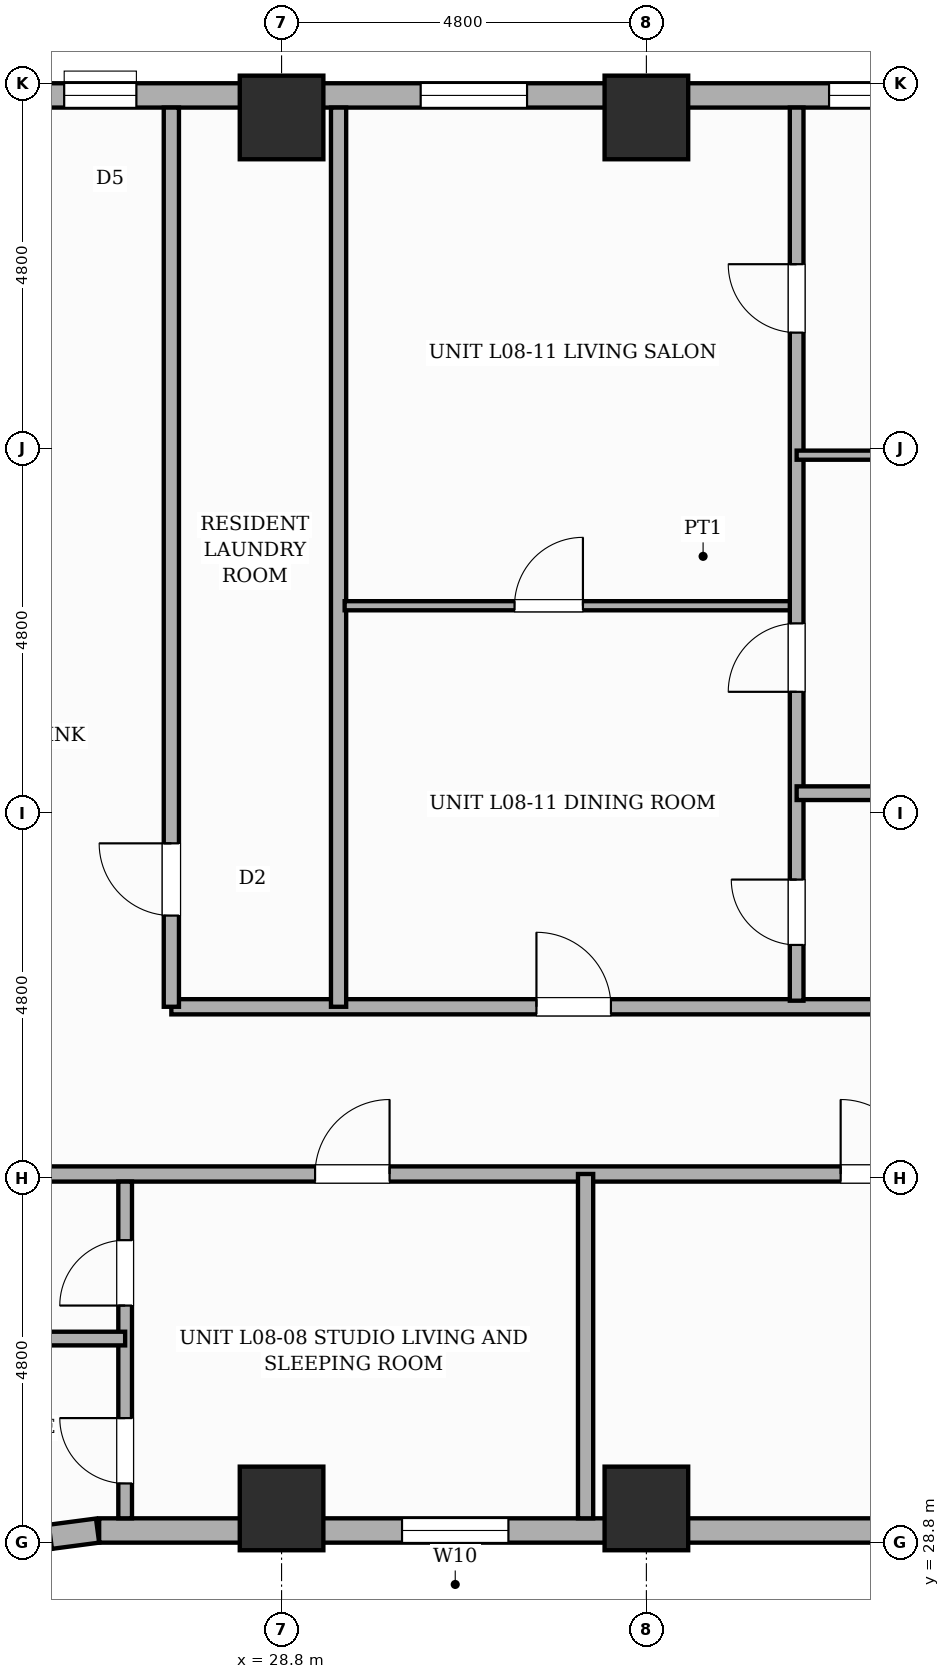
"""IFC4 building model, lengths in metres.
Left out: names, types, materials, properties, quantities, classifications, styles, units other than length and angle.
Written with IfcOpenShell. Run it as: python <this file> out.ifc"""

import sys

from ifc_helpers import new_model, si_unit, direction, frame, frame_2d, origin, origin_2d, place, context, subcontext, project, spatial, rectangle, extrude, element, fill, save


model = new_model("IFC4")
c1 = context("Model", 3, precision=1e-05, world=origin(), true_north=direction((0.0, 1.0)))
c2 = subcontext(c1, "Body", "Model", "MODEL_VIEW")
j1 = project(units=[si_unit("LENGTHUNIT", "METRE"), si_unit("PLANEANGLEUNIT", "RADIAN")], contexts=[c1])
p1 = place(None, origin())
s1 = spatial("IfcSite", under=j1, at=p1, CompositionType="ELEMENT")
p2 = place(p1, origin())
s2 = spatial("IfcBuilding", under=s1, at=p2, CompositionType="ELEMENT")
p3 = place(p2, frame((0.0, 0.0, 35.8)))
s3 = spatial("IfcBuildingStorey", under=s2, at=p3, CompositionType="ELEMENT", Elevation=35.8)
for number, where, z_axis, x_axis in (
    (1, (28.8, 29.25, 0.0), (0.0, 0.0, 1.0), (1.0, 0.0, 0.0)),
    (2, (28.8, 47.55, 0.0), (0.0, 0.0, 1.0), (1.0, 0.0, 0.0)),
    (3, (33.6, 29.25, 0.0), (0.0, 0.0, 1.0), (1.0, 0.0, 0.0)),
    (4, (33.6, 47.55, 0.0), (0.0, 0.0, 1.0), (1.0, 0.0, 0.0)),
):
    element("IfcColumn", number, at=place(p3, frame(where, z_axis=z_axis, x_axis=x_axis)), inside=s3, PredefinedType="COLUMN", context=c2, shape_type="SweptSolid", body=[
        extrude(rectangle(XDim=1.1, YDim=1.1, at=origin_2d()), origin(), (0.0, 0.0, 1.0), 3.6),
    ])
p4 = place(p3, frame((7.2, 47.84, 0.0), z_axis=(0.0, 0.0, 1.0), x_axis=(1.0, 0.0, 0.0)))
e5 = element("IfcWall", 5, at=p4, inside=s3, PredefinedType="STANDARD", context=c2, shape_type="SweptSolid", body=[
    extrude(rectangle(XDim=48.0, YDim=0.32, at=frame_2d((24.0, 0.0))), origin(), (0.0, 0.0, 1.0), 2.53),
])
p5 = place(p4, frame((28.803, 0.0, 0.65)))
e6 = element("IfcOpeningElement", 6, at=p5, cuts=e5, PredefinedType="OPENING", context=c2, shape_type="SweptSolid", body=[
    extrude(rectangle(XDim=1.4, YDim=1.1, at=frame_2d((0.7, 0.55))), frame((0.0, 0.17, 0.0), z_axis=(0.0, -1.0, 0.0), x_axis=(1.0, 0.0, 0.0)), (0.0, 0.0, 1.0), 0.34),
])
p6 = place(p4, frame((43.414, 0.0, 0.45)))
e7 = element("IfcOpeningElement", 7, at=p6, cuts=e5, PredefinedType="OPENING", context=c2, shape_type="SweptSolid", body=[
    extrude(rectangle(XDim=0.95, YDim=1.8, at=frame_2d((0.475, 0.9))), frame((0.0, 0.17, 0.0), z_axis=(0.0, -1.0, 0.0), x_axis=(1.0, 0.0, 0.0)), (0.0, 0.0, 1.0), 0.34),
])
p7 = place(p4, frame((18.74, 0.0, 0.45)))
e8 = element("IfcOpeningElement", 8, at=p7, cuts=e5, PredefinedType="OPENING", context=c2, shape_type="SweptSolid", body=[
    extrude(rectangle(XDim=0.95, YDim=1.8, at=frame_2d((0.475, 0.9))), frame((0.0, 0.17, 0.0), z_axis=(0.0, -1.0, 0.0), x_axis=(1.0, 0.0, 0.0)), (0.0, 0.0, 1.0), 0.34),
])
p8 = place(p4, frame((37.825, 0.0, 0.65)))
e9 = element("IfcOpeningElement", 9, at=p8, cuts=e5, PredefinedType="OPENING", context=c2, shape_type="SweptSolid", body=[
    extrude(rectangle(XDim=1.4, YDim=1.1, at=frame_2d((0.7, 0.55))), frame((0.0, 0.17, 0.0), z_axis=(0.0, -1.0, 0.0), x_axis=(1.0, 0.0, 0.0)), (0.0, 0.0, 1.0), 0.34),
])
p9 = place(p4, frame((0.47, 0.0, 0.45)))
e10 = element("IfcOpeningElement", 10, at=p9, cuts=e5, PredefinedType="OPENING", context=c2, shape_type="SweptSolid", body=[
    extrude(rectangle(XDim=0.95, YDim=1.8, at=frame_2d((0.475, 0.9))), frame((0.0, 0.17, 0.0), z_axis=(0.0, -1.0, 0.0), x_axis=(1.0, 0.0, 0.0)), (0.0, 0.0, 1.0), 0.34),
])
p10 = place(p4, frame((5.265, 0.0, 0.45)))
e11 = element("IfcOpeningElement", 11, at=p10, cuts=e5, PredefinedType="OPENING", context=c2, shape_type="SweptSolid", body=[
    extrude(rectangle(XDim=0.95, YDim=1.8, at=frame_2d((0.475, 0.9))), frame((0.0, 0.17, 0.0), z_axis=(0.0, -1.0, 0.0), x_axis=(1.0, 0.0, 0.0)), (0.0, 0.0, 1.0), 0.34),
])
p11 = place(p4, frame((23.43, 0.0, 0.65)))
e12 = element("IfcOpeningElement", 12, at=p11, cuts=e5, PredefinedType="OPENING", context=c2, shape_type="SweptSolid", body=[
    extrude(rectangle(XDim=1.4, YDim=1.1, at=frame_2d((0.7, 0.55))), frame((0.0, 0.17, 0.0), z_axis=(0.0, -1.0, 0.0), x_axis=(1.0, 0.0, 0.0)), (0.0, 0.0, 1.0), 0.34),
])
p12 = place(p4, frame((41.809, 0.0, 0.45)))
e13 = element("IfcOpeningElement", 13, at=p12, cuts=e5, PredefinedType="OPENING", context=c2, shape_type="SweptSolid", body=[
    extrude(rectangle(XDim=0.95, YDim=1.8, at=frame_2d((0.475, 0.9))), frame((0.0, 0.17, 0.0), z_axis=(0.0, -1.0, 0.0), x_axis=(1.0, 0.0, 0.0)), (0.0, 0.0, 1.0), 0.34),
])
p13 = place(p3, frame((55.2, 28.96, 0.0), z_axis=(0.0, 0.0, 1.0), x_axis=(-1.0, 0.0, 0.0)))
e14 = element("IfcWall", 14, at=p13, inside=s3, PredefinedType="STANDARD", context=c2, shape_type="SweptSolid", body=[
    extrude(rectangle(XDim=28.8, YDim=0.32, at=frame_2d((14.4, 0.0))), origin(), (0.0, 0.0, 1.0), 2.53),
])
p14 = place(p13, frame((23.415, 0.0, 0.65)))
e15 = element("IfcOpeningElement", 15, at=p14, cuts=e14, PredefinedType="OPENING", context=c2, shape_type="SweptSolid", body=[
    extrude(rectangle(XDim=1.4, YDim=1.1, at=frame_2d((0.7, 0.55))), frame((0.0, 0.17, 0.0), z_axis=(0.0, -1.0, 0.0), x_axis=(1.0, 0.0, 0.0)), (0.0, 0.0, 1.0), 0.34),
])
p15 = place(p13, frame((15.034, 0.0, 0.45)))
e16 = element("IfcOpeningElement", 16, at=p15, cuts=e14, PredefinedType="OPENING", context=c2, shape_type="SweptSolid", body=[
    extrude(rectangle(XDim=0.95, YDim=1.8, at=frame_2d((0.475, 0.9))), frame((0.0, 0.17, 0.0), z_axis=(0.0, -1.0, 0.0), x_axis=(1.0, 0.0, 0.0)), (0.0, 0.0, 1.0), 0.34),
])
p16 = place(p13, frame((5.25, 0.0, 0.45)))
e17 = element("IfcOpeningElement", 17, at=p16, cuts=e14, PredefinedType="OPENING", context=c2, shape_type="SweptSolid", body=[
    extrude(rectangle(XDim=0.95, YDim=1.8, at=frame_2d((0.475, 0.9))), frame((0.0, 0.17, 0.0), z_axis=(0.0, -1.0, 0.0), x_axis=(1.0, 0.0, 0.0)), (0.0, 0.0, 1.0), 0.34),
])
p17 = place(p13, frame((12.979, 0.0, 0.65)))
e18 = element("IfcOpeningElement", 18, at=p17, cuts=e14, PredefinedType="OPENING", context=c2, shape_type="SweptSolid", body=[
    extrude(rectangle(XDim=1.4, YDim=1.1, at=frame_2d((0.7, 0.55))), frame((0.0, 0.17, 0.0), z_axis=(0.0, -1.0, 0.0), x_axis=(1.0, 0.0, 0.0)), (0.0, 0.0, 1.0), 0.34),
])
p18 = place(p13, frame((0.47, 0.0, 0.65)))
e19 = element("IfcOpeningElement", 19, at=p18, cuts=e14, PredefinedType="OPENING", context=c2, shape_type="SweptSolid", body=[
    extrude(rectangle(XDim=1.4, YDim=1.1, at=frame_2d((0.7, 0.55))), frame((0.0, 0.17, 0.0), z_axis=(0.0, -1.0, 0.0), x_axis=(1.0, 0.0, 0.0)), (0.0, 0.0, 1.0), 0.34),
])
p19 = place(p3, frame((26.379, 28.958, 0.0), z_axis=(0.0, 0.0, 1.0), x_axis=(-0.991447664465, -0.130504898859, 0.0)))
e20 = element("IfcWall", 20, at=p19, inside=s3, PredefinedType="STANDARD", context=c2, shape_type="SweptSolid", body=[
    extrude(rectangle(XDim=0.627, YDim=0.32, at=frame_2d((0.313, 0.0))), origin(), (0.0, 0.0, 1.0), 2.53),
])
p20 = place(p3, frame((25.718, 28.866, 0.0), z_axis=(0.0, 0.0, 1.0), x_axis=(-0.923836271867, -0.382787856107, 0.0)))
e21 = element("IfcWall", 21, at=p20, inside=s3, PredefinedType="STANDARD", context=c2, shape_type="SweptSolid", body=[
    extrude(rectangle(XDim=0.626, YDim=0.32, at=frame_2d((0.313, 0.0))), origin(), (0.0, 0.0, 1.0), 3.35),
])
p21 = place(p3, frame((22.75, 33.65, 0.0), z_axis=(0.0, 0.0, 1.0), x_axis=(1.0, 0.0, 0.0)))
e22 = element("IfcWall", 22, at=p21, inside=s3, PredefinedType="PARTITIONING", context=c2, shape_type="SweptSolid", body=[
    extrude(rectangle(XDim=34.53, YDim=0.2, at=frame_2d((17.265, 0.0))), origin(), (0.0, 0.0, 1.0), 2.53),
])
p22 = place(p21, frame((6.491, 0.0, 0.0)))
e23 = element("IfcOpeningElement", 23, at=p22, cuts=e22, PredefinedType="OPENING", context=c2, shape_type="SweptSolid", body=[
    extrude(rectangle(XDim=0.98, YDim=2.18, at=frame_2d((0.49, 1.09))), frame((0.0, 0.11, 0.0), z_axis=(0.0, -1.0, 0.0), x_axis=(1.0, 0.0, 0.0)), (0.0, 0.0, 1.0), 0.22),
])
p23 = place(p21, frame((13.406, 0.0, 0.0)))
e24 = element("IfcOpeningElement", 24, at=p23, cuts=e22, PredefinedType="OPENING", context=c2, shape_type="SweptSolid", body=[
    extrude(rectangle(XDim=0.98, YDim=2.18, at=frame_2d((0.49, 1.09))), frame((0.0, 0.11, 0.0), z_axis=(0.0, -1.0, 0.0), x_axis=(1.0, 0.0, 0.0)), (0.0, 0.0, 1.0), 0.22),
])
p24 = place(p21, frame((24.09, 0.0, 0.0)))
e25 = element("IfcOpeningElement", 25, at=p24, cuts=e22, PredefinedType="OPENING", context=c2, shape_type="SweptSolid", body=[
    extrude(rectangle(XDim=0.98, YDim=2.18, at=frame_2d((0.49, 1.09))), frame((0.0, 0.11, 0.0), z_axis=(0.0, -1.0, 0.0), x_axis=(1.0, 0.0, 0.0)), (0.0, 0.0, 1.0), 0.22),
])
p25 = place(p3, frame((27.35, 35.85, 0.0), z_axis=(0.0, 0.0, 1.0), x_axis=(1.0, 0.0, 0.0)))
e26 = element("IfcWall", 26, at=p25, inside=s3, PredefinedType="PARTITIONING", context=c2, shape_type="SweptSolid", body=[
    extrude(rectangle(XDim=14.43, YDim=0.2, at=frame_2d((7.215, 0.0))), origin(), (0.0, 0.0, 1.0), 3.35),
])
p26 = place(p25, frame((4.803, 0.0, 0.0)))
e27 = element("IfcOpeningElement", 27, at=p26, cuts=e26, PredefinedType="OPENING", context=c2, shape_type="SweptSolid", body=[
    extrude(rectangle(XDim=0.98, YDim=2.18, at=frame_2d((0.49, 1.09))), frame((0.0, 0.11, 0.0), z_axis=(0.0, -1.0, 0.0), x_axis=(1.0, 0.0, 0.0)), (0.0, 0.0, 1.0), 0.22),
])
p27 = place(p3, frame((27.35, 35.85, 0.0), z_axis=(0.0, 0.0, 1.0), x_axis=(0.0, 1.0, 0.0)))
e28 = element("IfcWall", 28, at=p27, inside=s3, PredefinedType="PARTITIONING", context=c2, shape_type="SweptSolid", body=[
    extrude(rectangle(XDim=11.83, YDim=0.2, at=frame_2d((5.915, 0.0))), origin(), (0.0, 0.0, 1.0), 3.35),
])
p28 = place(p27, frame((1.2, 0.0, 0.0)))
e29 = element("IfcOpeningElement", 29, at=p28, cuts=e28, PredefinedType="OPENING", context=c2, shape_type="SweptSolid", body=[
    extrude(rectangle(XDim=0.95, YDim=2.15, at=frame_2d((0.475, 1.075))), frame((0.0, 0.11, 0.0), z_axis=(0.0, -1.0, 0.0), x_axis=(1.0, 0.0, 0.0)), (0.0, 0.0, 1.0), 0.22),
])
p29 = place(p3, frame((26.742, 29.12, 0.0), z_axis=(0.0, 0.0, 1.0), x_axis=(0.0, 1.0, 0.0)))
e30 = element("IfcWall", 30, at=p29, inside=s3, PredefinedType="PLUMBINGWALL", context=c2, shape_type="SweptSolid", body=[
    extrude(rectangle(XDim=4.43, YDim=0.18, at=frame_2d((2.215, 0.0))), origin(), (0.0, 0.0, 1.0), 3.35),
])
p30 = place(p29, frame((0.459, 0.0, 0.0)))
e31 = element("IfcOpeningElement", 31, at=p30, cuts=e30, PredefinedType="OPENING", context=c2, shape_type="SweptSolid", body=[
    extrude(rectangle(XDim=0.86, YDim=2.1, at=frame_2d((0.43, 1.05))), frame((0.0, 0.1, 0.0), z_axis=(0.0, -1.0, 0.0), x_axis=(1.0, 0.0, 0.0)), (0.0, 0.0, 1.0), 0.2),
])
p31 = place(p29, frame((2.799, 0.0, 0.0)))
e32 = element("IfcOpeningElement", 32, at=p31, cuts=e30, PredefinedType="OPENING", context=c2, shape_type="SweptSolid", body=[
    extrude(rectangle(XDim=0.86, YDim=2.1, at=frame_2d((0.43, 1.05))), frame((0.0, 0.1, 0.0), z_axis=(0.0, -1.0, 0.0), x_axis=(1.0, 0.0, 0.0)), (0.0, 0.0, 1.0), 0.2),
])
p32 = place(p3, frame((22.85, 31.485, 0.0), z_axis=(0.0, 0.0, 1.0), x_axis=(1.0, 0.0, 0.0)))
e33 = element("IfcWall", 33, at=p32, inside=s3, PredefinedType="PLUMBINGWALL", context=c2, shape_type="SweptSolid", body=[
    extrude(rectangle(XDim=3.892, YDim=0.18, at=frame_2d((1.946, 0.0))), origin(), (0.0, 0.0, 1.0), 3.35),
])
p33 = place(p3, frame((32.8, 29.12, 0.0), z_axis=(0.0, 0.0, 1.0), x_axis=(0.0, 1.0, 0.0)))
e34 = element("IfcWall", 34, at=p33, inside=s3, PredefinedType="SOLIDWALL", context=c2, shape_type="SweptSolid", body=[
    extrude(rectangle(XDim=4.53, YDim=0.2, at=frame_2d((2.265, 0.0))), origin(), (0.0, 0.0, 1.0), 3.35),
])
p34 = place(p3, frame((29.55, 35.85, 0.0), z_axis=(0.0, 0.0, 1.0), x_axis=(0.0, 1.0, 0.0)))
e35 = element("IfcWall", 35, at=p34, inside=s3, PredefinedType="SOLIDWALL", context=c2, shape_type="SweptSolid", body=[
    extrude(rectangle(XDim=11.83, YDim=0.2, at=frame_2d((5.915, 0.0))), origin(), (0.0, 0.0, 1.0), 3.35),
])
p35 = place(p3, frame((29.63, 41.126, 0.0), z_axis=(0.0, 0.0, 1.0), x_axis=(1.0, 0.0, 0.0)))
e36 = element("IfcWall", 36, at=p35, inside=s3, PredefinedType="PARTITIONING", context=c2, shape_type="SweptSolid", body=[
    extrude(rectangle(XDim=5.947, YDim=0.12, at=frame_2d((2.974, 0.0))), origin(), (0.0, 0.0, 1.0), 3.35),
])
p36 = place(p35, frame((2.235, 0.0, 0.0)))
e37 = element("IfcOpeningElement", 37, at=p36, cuts=e36, PredefinedType="OPENING", context=c2, shape_type="SweptSolid", body=[
    extrude(rectangle(XDim=0.9, YDim=2.15, at=frame_2d((0.45, 1.075))), frame((0.0, 0.07, 0.0), z_axis=(0.0, -1.0, 0.0), x_axis=(1.0, 0.0, 0.0)), (0.0, 0.0, 1.0), 0.14),
])
p37 = place(p3, frame((35.577, 35.93, 0.0), z_axis=(0.0, 0.0, 1.0), x_axis=(0.0, 1.0, 0.0)))
e38 = element("IfcWall", 38, at=p37, inside=s3, PredefinedType="PLUMBINGWALL", context=c2, shape_type="SweptSolid", body=[
    extrude(rectangle(XDim=11.75, YDim=0.18, at=frame_2d((5.875, 0.0))), origin(), (0.0, 0.0, 1.0), 3.35),
])
p38 = place(p37, frame((0.733, 0.0, 0.0)))
e39 = element("IfcOpeningElement", 39, at=p38, cuts=e38, PredefinedType="OPENING", context=c2, shape_type="SweptSolid", body=[
    extrude(rectangle(XDim=0.86, YDim=2.1, at=frame_2d((0.43, 1.05))), frame((0.0, 0.1, 0.0), z_axis=(0.0, -1.0, 0.0), x_axis=(1.0, 0.0, 0.0)), (0.0, 0.0, 1.0), 0.2),
])
p39 = place(p37, frame((4.064, 0.0, 0.0)))
e40 = element("IfcOpeningElement", 40, at=p39, cuts=e38, PredefinedType="OPENING", context=c2, shape_type="SweptSolid", body=[
    extrude(rectangle(XDim=0.9, YDim=2.15, at=frame_2d((0.45, 1.075))), frame((0.0, 0.1, 0.0), z_axis=(0.0, -1.0, 0.0), x_axis=(1.0, 0.0, 0.0)), (0.0, 0.0, 1.0), 0.2),
])
p40 = place(p37, frame((8.789, 0.0, 0.0)))
e41 = element("IfcOpeningElement", 41, at=p40, cuts=e38, PredefinedType="OPENING", context=c2, shape_type="SweptSolid", body=[
    extrude(rectangle(XDim=0.9, YDim=2.15, at=frame_2d((0.45, 1.075))), frame((0.0, 0.1, 0.0), z_axis=(0.0, -1.0, 0.0), x_axis=(1.0, 0.0, 0.0)), (0.0, 0.0, 1.0), 0.2),
])
p41 = place(p3, frame((35.577, 38.66, 0.0), z_axis=(0.0, 0.0, 1.0), x_axis=(1.0, 0.0, 0.0)))
e42 = element("IfcWall", 42, at=p41, inside=s3, PredefinedType="PLUMBINGWALL", context=c2, shape_type="SweptSolid", body=[
    extrude(rectangle(XDim=6.123, YDim=0.18, at=frame_2d((3.062, 0.0))), origin(), (0.0, 0.0, 1.0), 3.35),
])
p42 = place(p3, frame((35.577, 43.107, 0.0), z_axis=(0.0, 0.0, 1.0), x_axis=(1.0, 0.0, 0.0)))
e43 = element("IfcWall", 43, at=p42, inside=s3, PredefinedType="PARTITIONING", context=c2, shape_type="SweptSolid", body=[
    extrude(rectangle(XDim=6.123, YDim=0.12, at=frame_2d((3.062, 0.0))), origin(), (0.0, 0.0, 1.0), 3.35),
])
p43 = place(p5, origin())
e44 = element("IfcWindow", 44, at=p43, inside=s3, PartitioningType="SINGLE_PANEL", PredefinedType="WINDOW", context=c2, shape_type="SweptSolid", body=[
    extrude(rectangle(XDim=1.4, YDim=1.1, at=frame_2d((0.7, 0.55))), frame((0.0, 0.03, 0.0), z_axis=(0.0, -1.0, 0.0), x_axis=(1.0, 0.0, 0.0)), (0.0, 0.0, 1.0), 0.06),
])
fill(e6, e44)
p44 = place(p7, origin())
e45 = element("IfcWindow", 45, at=p44, inside=s3, PartitioningType="SINGLE_PANEL", PredefinedType="WINDOW", context=c2, shape_type="SweptSolid", body=[
    extrude(rectangle(XDim=0.95, YDim=1.8, at=frame_2d((0.475, 0.9))), frame((0.0, 0.03, 0.0), z_axis=(0.0, -1.0, 0.0), x_axis=(1.0, 0.0, 0.0)), (0.0, 0.0, 1.0), 0.06),
])
fill(e8, e45)
p45 = place(p11, origin())
e46 = element("IfcWindow", 46, at=p45, inside=s3, PartitioningType="SINGLE_PANEL", PredefinedType="WINDOW", context=c2, shape_type="SweptSolid", body=[
    extrude(rectangle(XDim=1.4, YDim=1.1, at=frame_2d((0.7, 0.55))), frame((0.0, 0.03, 0.0), z_axis=(0.0, -1.0, 0.0), x_axis=(1.0, 0.0, 0.0)), (0.0, 0.0, 1.0), 0.06),
])
fill(e12, e46)
p46 = place(p14, origin())
e47 = element("IfcWindow", 47, at=p46, inside=s3, PartitioningType="SINGLE_PANEL", PredefinedType="WINDOW", context=c2, shape_type="SweptSolid", body=[
    extrude(rectangle(XDim=1.4, YDim=1.1, at=frame_2d((0.7, 0.55))), frame((0.0, 0.03, 0.0), z_axis=(0.0, -1.0, 0.0), x_axis=(1.0, 0.0, 0.0)), (0.0, 0.0, 1.0), 0.06),
])
fill(e15, e47)
p47 = place(p22, origin())
e48 = element("IfcDoor", 48, at=p47, inside=s3, OperationType="SINGLE_SWING_RIGHT", PredefinedType="DOOR", context=c2, shape_type="SweptSolid", body=[
    extrude(rectangle(XDim=0.98, YDim=2.18, at=frame_2d((0.49, 1.09))), frame((0.0, 0.025, 0.0), z_axis=(0.0, -1.0, 0.0), x_axis=(1.0, 0.0, 0.0)), (0.0, 0.0, 1.0), 0.05),
])
fill(e23, e48)
p48 = place(p30, origin())
e49 = element("IfcDoor", 49, at=p48, inside=s3, OperationType="SINGLE_SWING_RIGHT", PredefinedType="DOOR", context=c2, shape_type="SweptSolid", body=[
    extrude(rectangle(XDim=0.86, YDim=2.1, at=frame_2d((0.43, 1.05))), frame((0.0, 0.025, 0.0), z_axis=(0.0, -1.0, 0.0), x_axis=(1.0, 0.0, 0.0)), (0.0, 0.0, 1.0), 0.05),
])
fill(e31, e49)
p49 = place(p31, origin())
e50 = element("IfcDoor", 50, at=p49, inside=s3, OperationType="SINGLE_SWING_LEFT", PredefinedType="DOOR", context=c2, shape_type="SweptSolid", body=[
    extrude(rectangle(XDim=0.86, YDim=2.1, at=frame_2d((0.43, 1.05))), frame((0.0, 0.025, 0.0), z_axis=(0.0, -1.0, 0.0), x_axis=(1.0, 0.0, 0.0)), (0.0, 0.0, 1.0), 0.05),
])
fill(e32, e50)
p50 = place(p23, origin())
e51 = element("IfcDoor", 51, at=p50, inside=s3, OperationType="SINGLE_SWING_LEFT", PredefinedType="DOOR", context=c2, shape_type="SweptSolid", body=[
    extrude(rectangle(XDim=0.98, YDim=2.18, at=frame_2d((0.49, 1.09))), frame((0.0, 0.025, 0.0), z_axis=(0.0, -1.0, 0.0), x_axis=(1.0, 0.0, 0.0)), (0.0, 0.0, 1.0), 0.05),
])
fill(e24, e51)
p51 = place(p28, origin())
e52 = element("IfcDoor", 52, at=p51, inside=s3, OperationType="SINGLE_SWING_RIGHT", PredefinedType="DOOR", context=c2, shape_type="SweptSolid", body=[
    extrude(rectangle(XDim=0.95, YDim=2.15, at=frame_2d((0.475, 1.075))), frame((0.0, 0.025, 0.0), z_axis=(0.0, -1.0, 0.0), x_axis=(1.0, 0.0, 0.0)), (0.0, 0.0, 1.0), 0.05),
])
fill(e29, e52)
p52 = place(p26, origin())
e53 = element("IfcDoor", 53, at=p52, inside=s3, OperationType="SINGLE_SWING_LEFT", PredefinedType="DOOR", context=c2, shape_type="SweptSolid", body=[
    extrude(rectangle(XDim=0.98, YDim=2.18, at=frame_2d((0.49, 1.09))), frame((0.0, 0.025, 0.0), z_axis=(0.0, -1.0, 0.0), x_axis=(1.0, 0.0, 0.0)), (0.0, 0.0, 1.0), 0.05),
])
fill(e27, e53)
p53 = place(p36, origin())
e54 = element("IfcDoor", 54, at=p53, inside=s3, OperationType="SINGLE_SWING_RIGHT", PredefinedType="DOOR", context=c2, shape_type="SweptSolid", body=[
    extrude(rectangle(XDim=0.9, YDim=2.15, at=frame_2d((0.45, 1.075))), frame((0.0, 0.025, 0.0), z_axis=(0.0, -1.0, 0.0), x_axis=(1.0, 0.0, 0.0)), (0.0, 0.0, 1.0), 0.05),
])
fill(e37, e54)
p54 = place(p38, origin())
e55 = element("IfcDoor", 55, at=p54, inside=s3, OperationType="SINGLE_SWING_RIGHT", PredefinedType="DOOR", context=c2, shape_type="SweptSolid", body=[
    extrude(rectangle(XDim=0.86, YDim=2.1, at=frame_2d((0.43, 1.05))), frame((0.0, 0.025, 0.0), z_axis=(0.0, -1.0, 0.0), x_axis=(1.0, 0.0, 0.0)), (0.0, 0.0, 1.0), 0.05),
])
fill(e39, e55)
p55 = place(p39, origin())
e56 = element("IfcDoor", 56, at=p55, inside=s3, OperationType="SINGLE_SWING_LEFT", PredefinedType="DOOR", context=c2, shape_type="SweptSolid", body=[
    extrude(rectangle(XDim=0.9, YDim=2.15, at=frame_2d((0.45, 1.075))), frame((0.0, 0.025, 0.0), z_axis=(0.0, -1.0, 0.0), x_axis=(1.0, 0.0, 0.0)), (0.0, 0.0, 1.0), 0.05),
])
fill(e40, e56)
p56 = place(p40, origin())
e57 = element("IfcDoor", 57, at=p56, inside=s3, OperationType="SINGLE_SWING_RIGHT", PredefinedType="DOOR", context=c2, shape_type="SweptSolid", body=[
    extrude(rectangle(XDim=0.9, YDim=2.15, at=frame_2d((0.45, 1.075))), frame((0.0, 0.025, 0.0), z_axis=(0.0, -1.0, 0.0), x_axis=(1.0, 0.0, 0.0)), (0.0, 0.0, 1.0), 0.05),
])
fill(e41, e57)
save(model, sys.argv[1])
